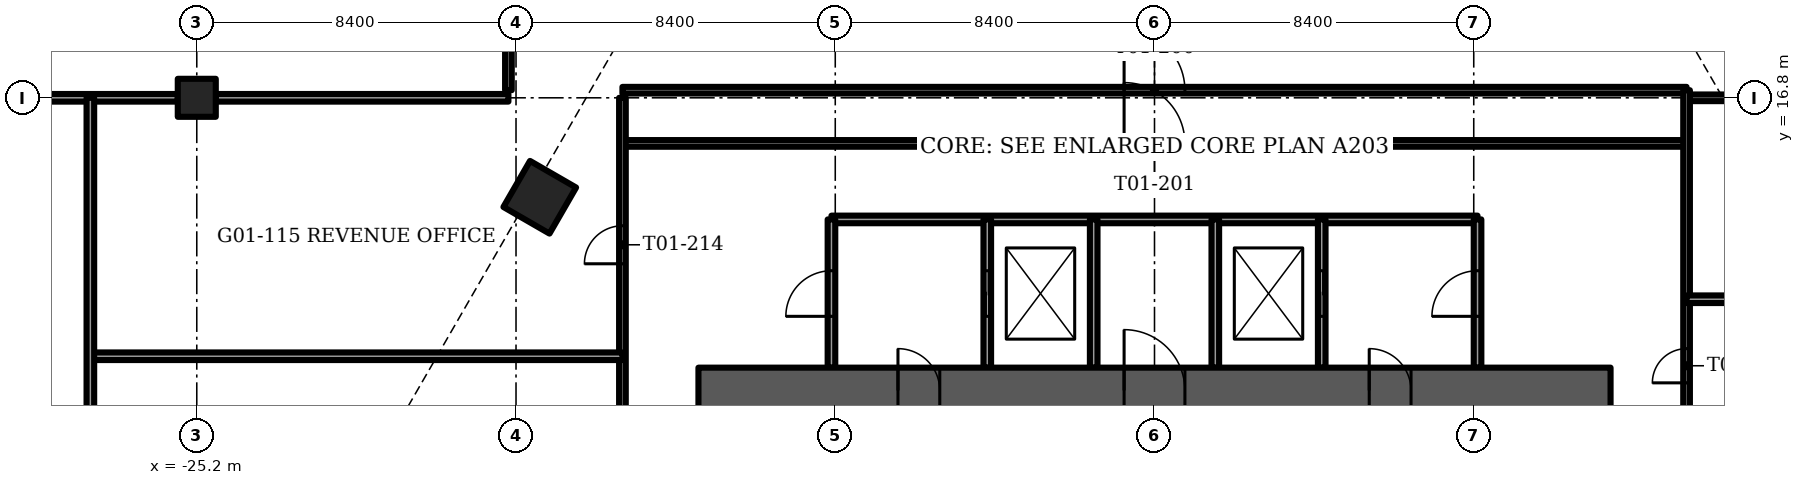
"""IFC4 building model, lengths in metres.
Left out: names, types, materials, properties, quantities, classifications, styles, units other than length and angle.
Written with IfcOpenShell. Run it as: python <this file> out.ifc"""

import sys

from ifc_helpers import new_model, si_unit, direction, frame, frame_2d, origin, origin_2d, place, context, subcontext, project, spatial, rectangle, extrude, element, fill, save


model = new_model("IFC4")
c1 = context("Model", 3, precision=1e-05, world=origin(), true_north=direction((0.0, 1.0)))
c2 = subcontext(c1, "Body", "Model", "MODEL_VIEW")
j1 = project(units=[si_unit("LENGTHUNIT", "METRE"), si_unit("PLANEANGLEUNIT", "RADIAN")], contexts=[c1])
p1 = place(None, origin())
s1 = spatial("IfcSite", under=j1, at=p1, CompositionType="ELEMENT")
p2 = place(p1, origin())
s2 = spatial("IfcBuilding", under=s1, at=p2, CompositionType="ELEMENT")
p3 = place(p2, frame((0.0, 0.0, 6.0)))
s3 = spatial("IfcBuildingStorey", under=s2, at=p3, CompositionType="ELEMENT", Elevation=6.0)
p4 = place(p3, frame((-25.2, 16.8, -0.35), z_axis=(0.0, 0.0, 1.0), x_axis=(1.0, 0.0, 0.0)))
e1 = element("IfcColumn", 1, at=p4, inside=s3, PredefinedType="COLUMN", context=c2, shape_type="SweptSolid", body=[
    extrude(rectangle(XDim=1.0, YDim=1.0, at=origin_2d()), origin(), (0.0, 0.0, 1.0), 4.0),
])
p5 = place(p3, frame((-16.175, 14.183, -1.2), z_axis=(0.0, 0.0, 1.0), x_axis=(0.5, 0.866025403784, 0.0)))
e2 = element("IfcColumn", 2, at=p5, inside=s3, PredefinedType="COLUMN", context=c2, shape_type="SweptSolid", body=[
    extrude(rectangle(XDim=1.4, YDim=1.4, at=origin_2d()), origin(), (0.0, 0.0, 1.0), 4.0),
])
p6 = place(p3, frame((-12.0, 9.1, -0.35), z_axis=(0.0, 0.0, 1.0), x_axis=(1.0, 0.0, 0.0)))
e3 = element("IfcWall", 3, at=p6, inside=s3, PredefinedType="SHEAR", context=c2, shape_type="SweptSolid", body=[
    extrude(rectangle(XDim=24.0, YDim=1.2, at=frame_2d((12.0, 0.0))), origin(), (0.0, 0.0, 1.0), 4.05),
])
p7 = place(p6, frame((11.2, 0.0, 0.0)))
e4 = element("IfcOpeningElement", 4, at=p7, cuts=e3, PredefinedType="OPENING", context=c2, shape_type="SweptSolid", body=[
    extrude(rectangle(XDim=1.6, YDim=2.1, at=frame_2d((0.8, 1.05))), frame((0.0, 0.6, 0.0), z_axis=(0.0, -1.0, 0.0), x_axis=(1.0, 0.0, 0.0)), (0.0, 0.0, 1.0), 1.2),
])
p8 = place(p6, frame((5.25, 0.0, 0.0)))
e5 = element("IfcOpeningElement", 5, at=p8, cuts=e3, PredefinedType="OPENING", context=c2, shape_type="SweptSolid", body=[
    extrude(rectangle(XDim=1.1, YDim=2.1, at=frame_2d((0.55, 1.05))), frame((0.0, 0.6, 0.0), z_axis=(0.0, -1.0, 0.0), x_axis=(1.0, 0.0, 0.0)), (0.0, 0.0, 1.0), 1.2),
])
p9 = place(p6, frame((17.65, 0.0, 0.0)))
e6 = element("IfcOpeningElement", 6, at=p9, cuts=e3, PredefinedType="OPENING", context=c2, shape_type="SweptSolid", body=[
    extrude(rectangle(XDim=1.1, YDim=2.1, at=frame_2d((0.55, 1.05))), frame((0.0, 0.6, 0.0), z_axis=(0.0, -1.0, 0.0), x_axis=(1.0, 0.0, 0.0)), (0.0, 0.0, 1.0), 1.2),
])
p10 = place(p3, frame((-8.5, 13.6, 0.0), z_axis=(0.0, 0.0, 1.0), x_axis=(1.0, 0.0, 0.0)))
e7 = element("IfcWall", 7, at=p10, inside=s3, PredefinedType="PARTITIONING", context=c2, shape_type="SweptSolid", body=[
    extrude(rectangle(XDim=17.0, YDim=0.2, at=frame_2d((8.5, 0.0))), origin(), (0.0, 0.0, 1.0), 3.7),
])
p11 = place(p3, frame((-8.5, 9.7, 0.0), z_axis=(0.0, 0.0, 1.0), x_axis=(0.0, 1.0, 0.0)))
e8 = element("IfcWall", 8, at=p11, inside=s3, PredefinedType="PARTITIONING", context=c2, shape_type="SweptSolid", body=[
    extrude(rectangle(XDim=3.9, YDim=0.2, at=frame_2d((1.95, 0.0))), origin(), (0.0, 0.0, 1.0), 3.7),
])
p12 = place(p11, frame((1.35, 0.0, 0.0)))
e9 = element("IfcOpeningElement", 9, at=p12, cuts=e8, PredefinedType="OPENING", context=c2, shape_type="SweptSolid", body=[
    extrude(rectangle(XDim=1.2, YDim=2.1, at=frame_2d((0.6, 1.05))), frame((0.0, 0.1, 0.0), z_axis=(0.0, -1.0, 0.0), x_axis=(1.0, 0.0, 0.0)), (0.0, 0.0, 1.0), 0.2),
])
p13 = place(p3, frame((8.5, 9.7, 0.0), z_axis=(0.0, 0.0, 1.0), x_axis=(0.0, 1.0, 0.0)))
e10 = element("IfcWall", 10, at=p13, inside=s3, PredefinedType="PARTITIONING", context=c2, shape_type="SweptSolid", body=[
    extrude(rectangle(XDim=3.9, YDim=0.2, at=frame_2d((1.95, 0.0))), origin(), (0.0, 0.0, 1.0), 3.7),
])
p14 = place(p13, frame((1.35, 0.0, 0.0)))
e11 = element("IfcOpeningElement", 11, at=p14, cuts=e10, PredefinedType="OPENING", context=c2, shape_type="SweptSolid", body=[
    extrude(rectangle(XDim=1.2, YDim=2.1, at=frame_2d((0.6, 1.05))), frame((0.0, 0.1, 0.0), z_axis=(0.0, -1.0, 0.0), x_axis=(1.0, 0.0, 0.0)), (0.0, 0.0, 1.0), 0.2),
])
p15 = place(p3, frame((-4.4, 9.7, 0.0), z_axis=(0.0, 0.0, 1.0), x_axis=(0.0, 1.0, 0.0)))
e12 = element("IfcWall", 12, at=p15, inside=s3, PredefinedType="PARTITIONING", context=c2, shape_type="SweptSolid", body=[
    extrude(rectangle(XDim=3.9, YDim=0.2, at=frame_2d((1.95, 0.0))), origin(), (0.0, 0.0, 1.0), 3.7),
])
p16 = place(p15, frame((1.35, 0.0, 0.0)))
e13 = element("IfcOpeningElement", 13, at=p16, cuts=e12, PredefinedType="OPENING", context=c2, shape_type="SweptSolid", body=[
    extrude(rectangle(XDim=1.2, YDim=2.1, at=frame_2d((0.6, 1.05))), frame((0.0, 0.1, 0.0), z_axis=(0.0, -1.0, 0.0), x_axis=(1.0, 0.0, 0.0)), (0.0, 0.0, 1.0), 0.2),
])
p17 = place(p3, frame((4.4, 9.7, 0.0), z_axis=(0.0, 0.0, 1.0), x_axis=(0.0, 1.0, 0.0)))
e14 = element("IfcWall", 14, at=p17, inside=s3, PredefinedType="PARTITIONING", context=c2, shape_type="SweptSolid", body=[
    extrude(rectangle(XDim=3.9, YDim=0.2, at=frame_2d((1.95, 0.0))), origin(), (0.0, 0.0, 1.0), 3.7),
])
p18 = place(p17, frame((1.35, 0.0, 0.0)))
e15 = element("IfcOpeningElement", 15, at=p18, cuts=e14, PredefinedType="OPENING", context=c2, shape_type="SweptSolid", body=[
    extrude(rectangle(XDim=1.2, YDim=2.1, at=frame_2d((0.6, 1.05))), frame((0.0, 0.1, 0.0), z_axis=(0.0, -1.0, 0.0), x_axis=(1.0, 0.0, 0.0)), (0.0, 0.0, 1.0), 0.2),
])
for number, where, z_axis, x_axis in (
    (16, (-1.6, 9.7, 0.0), (0.0, 0.0, 1.0), (0.0, 1.0, 0.0)),
    (17, (1.6, 9.7, 0.0), (0.0, 0.0, 1.0), (0.0, 1.0, 0.0)),
):
    element("IfcWall", number, at=place(p3, frame(where, z_axis=z_axis, x_axis=x_axis)), inside=s3, PredefinedType="PARTITIONING", context=c2, shape_type="SweptSolid", body=[
        extrude(rectangle(XDim=3.9, YDim=0.2, at=frame_2d((1.95, 0.0))), origin(), (0.0, 0.0, 1.0), 3.7),
    ])
p19 = place(p3, frame((-14.0, 15.6, 0.0), z_axis=(0.0, 0.0, 1.0), x_axis=(1.0, 0.0, 0.0)))
e18 = element("IfcWall", 18, at=p19, inside=s3, PredefinedType="PARTITIONING", context=c2, shape_type="SweptSolid", body=[
    extrude(rectangle(XDim=28.0, YDim=0.175, at=frame_2d((14.0, 0.0))), origin(), (0.0, 0.0, 1.0), 3.65),
])
p20 = place(p19, frame((13.2, 0.0, 0.0)))
e19 = element("IfcOpeningElement", 19, at=p20, cuts=e18, PredefinedType="OPENING", context=c2, shape_type="SweptSolid", body=[
    extrude(rectangle(XDim=1.6, YDim=2.1, at=frame_2d((0.8, 1.05))), frame((0.0, 0.087, 0.0), z_axis=(0.0, -1.0, 0.0), x_axis=(1.0, 0.0, 0.0)), (0.0, 0.0, 1.0), 0.175),
])
p21 = place(p3, frame((14.0, 16.8, 0.0), z_axis=(0.0, 0.0, 1.0), x_axis=(1.0, 0.0, 0.0)))
e20 = element("IfcWall", 20, at=p21, inside=s3, PredefinedType="PARTITIONING", context=c2, shape_type="SweptSolid", body=[
    extrude(rectangle(XDim=8.302, YDim=0.175, at=frame_2d((4.151, 0.0))), origin(), (0.0, 0.0, 1.0), 2.8),
])
p22 = place(p3, frame((-14.0, 17.0, 0.0), z_axis=(0.0, 0.0, 1.0), x_axis=(1.0, 0.0, 0.0)))
e21 = element("IfcWall", 21, at=p22, inside=s3, PredefinedType="PARTITIONING", context=c2, shape_type="SweptSolid", body=[
    extrude(rectangle(XDim=28.0, YDim=0.175, at=frame_2d((14.0, 0.0))), origin(), (0.0, 0.0, 1.0), 3.65),
])
p23 = place(p22, frame((13.2, 0.0, 0.0)))
e22 = element("IfcOpeningElement", 22, at=p23, cuts=e21, PredefinedType="OPENING", context=c2, shape_type="SweptSolid", body=[
    extrude(rectangle(XDim=1.6, YDim=2.1, at=frame_2d((0.8, 1.05))), frame((0.0, 0.087, 0.0), z_axis=(0.0, -1.0, 0.0), x_axis=(1.0, 0.0, 0.0)), (0.0, 0.0, 1.0), 0.175),
])
p24 = place(p3, frame((-17.0, 17.0, 0.0), z_axis=(0.0, 0.0, 1.0), x_axis=(0.0, 1.0, 0.0)))
e23 = element("IfcWall", 23, at=p24, inside=s3, PredefinedType="PARTITIONING", context=c2, shape_type="SweptSolid", body=[
    extrude(rectangle(XDim=5.2, YDim=0.175, at=frame_2d((2.6, 0.0))), origin(), (0.0, 0.0, 1.0), 3.65),
])
p25 = place(p24, frame((2.1, 0.0, 0.0)))
e24 = element("IfcOpeningElement", 24, at=p25, cuts=e23, PredefinedType="OPENING", context=c2, shape_type="SweptSolid", body=[
    extrude(rectangle(XDim=1.0, YDim=2.1, at=frame_2d((0.5, 1.05))), frame((0.0, 0.087, 0.0), z_axis=(0.0, -1.0, 0.0), x_axis=(1.0, 0.0, 0.0)), (0.0, 0.0, 1.0), 0.175),
])
p26 = place(p3, frame((-14.0, -29.195, 0.0), z_axis=(0.0, 0.0, 1.0), x_axis=(0.0, 1.0, 0.0)))
e25 = element("IfcWall", 25, at=p26, inside=s3, PredefinedType="PARTITIONING", context=c2, shape_type="SweptSolid", body=[
    extrude(rectangle(XDim=45.995, YDim=0.175, at=frame_2d((22.998, 0.0))), origin(), (0.0, 0.0, 1.0), 2.8),
])
p27 = place(p26, frame((4.395, 0.0, 0.0)))
e26 = element("IfcOpeningElement", 26, at=p27, cuts=e25, PredefinedType="OPENING", context=c2, shape_type="SweptSolid", body=[
    extrude(rectangle(XDim=1.6, YDim=2.1, at=frame_2d((0.8, 1.05))), frame((0.0, 0.087, 0.0), z_axis=(0.0, -1.0, 0.0), x_axis=(1.0, 0.0, 0.0)), (0.0, 0.0, 1.0), 0.175),
])
p28 = place(p26, frame((9.815, 0.0, 0.0)))
e27 = element("IfcOpeningElement", 27, at=p28, cuts=e25, PredefinedType="OPENING", context=c2, shape_type="SweptSolid", body=[
    extrude(rectangle(XDim=0.9, YDim=2.1, at=frame_2d((0.45, 1.05))), frame((0.0, 0.087, 0.0), z_axis=(0.0, -1.0, 0.0), x_axis=(1.0, 0.0, 0.0)), (0.0, 0.0, 1.0), 0.175),
])
p29 = place(p26, frame((20.595, 0.0, 0.0)))
e28 = element("IfcOpeningElement", 28, at=p29, cuts=e25, PredefinedType="OPENING", context=c2, shape_type="SweptSolid", body=[
    extrude(rectangle(XDim=1.0, YDim=2.1, at=frame_2d((0.5, 1.05))), frame((0.0, 0.087, 0.0), z_axis=(0.0, -1.0, 0.0), x_axis=(1.0, 0.0, 0.0)), (0.0, 0.0, 1.0), 0.175),
])
p30 = place(p26, frame((28.595, 0.0, 0.0)))
e29 = element("IfcOpeningElement", 29, at=p30, cuts=e25, PredefinedType="OPENING", context=c2, shape_type="SweptSolid", body=[
    extrude(rectangle(XDim=1.0, YDim=2.1, at=frame_2d((0.5, 1.05))), frame((0.0, 0.087, 0.0), z_axis=(0.0, -1.0, 0.0), x_axis=(1.0, 0.0, 0.0)), (0.0, 0.0, 1.0), 0.175),
])
p31 = place(p26, frame((35.445, 0.0, 0.0)))
e30 = element("IfcOpeningElement", 30, at=p31, cuts=e25, PredefinedType="OPENING", context=c2, shape_type="SweptSolid", body=[
    extrude(rectangle(XDim=1.0, YDim=2.1, at=frame_2d((0.5, 1.05))), frame((0.0, 0.087, 0.0), z_axis=(0.0, -1.0, 0.0), x_axis=(1.0, 0.0, 0.0)), (0.0, 0.0, 1.0), 0.175),
])
p32 = place(p26, frame((41.628, 0.0, 0.0)))
e31 = element("IfcOpeningElement", 31, at=p32, cuts=e25, PredefinedType="OPENING", context=c2, shape_type="SweptSolid", body=[
    extrude(rectangle(XDim=1.0, YDim=2.1, at=frame_2d((0.5, 1.05))), frame((0.0, 0.087, 0.0), z_axis=(0.0, -1.0, 0.0), x_axis=(1.0, 0.0, 0.0)), (0.0, 0.0, 1.0), 0.175),
])
p33 = place(p3, frame((14.0, -21.0, 0.0), z_axis=(0.0, 0.0, 1.0), x_axis=(0.0, 1.0, 0.0)))
e32 = element("IfcWall", 32, at=p33, inside=s3, PredefinedType="PARTITIONING", context=c2, shape_type="SweptSolid", body=[
    extrude(rectangle(XDim=38.0, YDim=0.175, at=frame_2d((19.0, 0.0))), origin(), (0.0, 0.0, 1.0), 2.8),
])
p34 = place(p33, frame((12.2, 0.0, 0.0)))
e33 = element("IfcOpeningElement", 33, at=p34, cuts=e32, PredefinedType="OPENING", context=c2, shape_type="SweptSolid", body=[
    extrude(rectangle(XDim=0.9, YDim=2.1, at=frame_2d((0.45, 1.05))), frame((0.0, 0.087, 0.0), z_axis=(0.0, -1.0, 0.0), x_axis=(1.0, 0.0, 0.0)), (0.0, 0.0, 1.0), 0.175),
])
p35 = place(p33, frame((19.7, 0.0, 0.0)))
e34 = element("IfcOpeningElement", 34, at=p35, cuts=e32, PredefinedType="OPENING", context=c2, shape_type="SweptSolid", body=[
    extrude(rectangle(XDim=0.9, YDim=2.1, at=frame_2d((0.45, 1.05))), frame((0.0, 0.087, 0.0), z_axis=(0.0, -1.0, 0.0), x_axis=(1.0, 0.0, 0.0)), (0.0, 0.0, 1.0), 0.175),
])
p36 = place(p33, frame((25.55, 0.0, 0.0)))
e35 = element("IfcOpeningElement", 35, at=p36, cuts=e32, PredefinedType="OPENING", context=c2, shape_type="SweptSolid", body=[
    extrude(rectangle(XDim=0.9, YDim=2.1, at=frame_2d((0.45, 1.05))), frame((0.0, 0.087, 0.0), z_axis=(0.0, -1.0, 0.0), x_axis=(1.0, 0.0, 0.0)), (0.0, 0.0, 1.0), 0.175),
])
p37 = place(p33, frame((30.3, 0.0, 0.0)))
e36 = element("IfcOpeningElement", 36, at=p37, cuts=e32, PredefinedType="OPENING", context=c2, shape_type="SweptSolid", body=[
    extrude(rectangle(XDim=0.9, YDim=2.1, at=frame_2d((0.45, 1.05))), frame((0.0, 0.087, 0.0), z_axis=(0.0, -1.0, 0.0), x_axis=(1.0, 0.0, 0.0)), (0.0, 0.0, 1.0), 0.175),
])
p38 = place(p3, frame((-28.0, 10.0, 0.0), z_axis=(0.0, 0.0, 1.0), x_axis=(1.0, 0.0, 0.0)))
e37 = element("IfcWall", 37, at=p38, inside=s3, PredefinedType="PARTITIONING", context=c2, shape_type="SweptSolid", body=[
    extrude(rectangle(XDim=14.0, YDim=0.2, at=frame_2d((7.0, 0.0))), origin(), (0.0, 0.0, 1.0), 2.8),
])
p39 = place(p3, frame((14.0, 11.5, 0.0), z_axis=(0.0, 0.0, 1.0), x_axis=(1.0, 0.0, 0.0)))
e38 = element("IfcWall", 38, at=p39, inside=s3, PredefinedType="PARTITIONING", context=c2, shape_type="SweptSolid", body=[
    extrude(rectangle(XDim=8.302, YDim=0.2, at=frame_2d((4.151, 0.0))), origin(), (0.0, 0.0, 1.0), 2.8),
])
p40 = place(p39, frame((1.625, 0.0, 0.0)))
e39 = element("IfcOpeningElement", 39, at=p40, cuts=e38, PredefinedType="OPENING", context=c2, shape_type="SweptSolid", body=[
    extrude(rectangle(XDim=0.9, YDim=2.1, at=frame_2d((0.45, 1.05))), frame((0.0, 0.1, 0.0), z_axis=(0.0, -1.0, 0.0), x_axis=(1.0, 0.0, 0.0)), (0.0, 0.0, 1.0), 0.2),
])
p41 = place(p39, frame((5.776, 0.0, 0.0)))
e40 = element("IfcOpeningElement", 40, at=p41, cuts=e38, PredefinedType="OPENING", context=c2, shape_type="SweptSolid", body=[
    extrude(rectangle(XDim=0.9, YDim=2.1, at=frame_2d((0.45, 1.05))), frame((0.0, 0.1, 0.0), z_axis=(0.0, -1.0, 0.0), x_axis=(1.0, 0.0, 0.0)), (0.0, 0.0, 1.0), 0.2),
])
p42 = place(p3, frame((-33.1, 16.8, 0.0), z_axis=(0.0, 0.0, 1.0), x_axis=(1.0, 0.0, 0.0)))
e41 = element("IfcWall", 41, at=p42, inside=s3, PredefinedType="PARTITIONING", context=c2, shape_type="SweptSolid", body=[
    extrude(rectangle(XDim=7.4, YDim=0.2, at=frame_2d((3.7, 0.0))), origin(), (0.0, 0.0, 1.0), 3.65),
])
p43 = place(p3, frame((-24.7, 16.8, 0.0), z_axis=(0.0, 0.0, 1.0), x_axis=(1.0, 0.0, 0.0)))
e42 = element("IfcWall", 42, at=p43, inside=s3, PredefinedType="PARTITIONING", context=c2, shape_type="SweptSolid", body=[
    extrude(rectangle(XDim=7.7, YDim=0.2, at=frame_2d((3.85, 0.0))), origin(), (0.0, 0.0, 1.0), 3.65),
])
p44 = place(p3, frame((-28.0, -21.0, 0.0), z_axis=(0.0, 0.0, 1.0), x_axis=(0.0, 1.0, 0.0)))
e43 = element("IfcWall", 43, at=p44, inside=s3, PredefinedType="PARTITIONING", context=c2, shape_type="SweptSolid", body=[
    extrude(rectangle(XDim=37.8, YDim=0.2, at=frame_2d((18.9, 0.0))), origin(), (0.0, 0.0, 1.0), 3.65),
])
p45 = place(p44, frame((19.45, 0.0, 0.0)))
e44 = element("IfcOpeningElement", 44, at=p45, cuts=e43, PredefinedType="OPENING", context=c2, shape_type="SweptSolid", body=[
    extrude(rectangle(XDim=1.0, YDim=2.1, at=frame_2d((0.5, 1.05))), frame((0.0, 0.1, 0.0), z_axis=(0.0, -1.0, 0.0), x_axis=(1.0, 0.0, 0.0)), (0.0, 0.0, 1.0), 0.2),
])
p46 = place(p7, origin())
e45 = element("IfcDoor", 45, at=p46, inside=s3, OperationType="DOUBLE_DOOR_SINGLE_SWING", PredefinedType="DOOR", context=c2, shape_type="SweptSolid", body=[
    extrude(rectangle(XDim=1.6, YDim=2.1, at=frame_2d((0.8, 1.05))), frame((0.0, 0.025, 0.0), z_axis=(0.0, -1.0, 0.0), x_axis=(1.0, 0.0, 0.0)), (0.0, 0.0, 1.0), 0.05),
])
fill(e4, e45)
p47 = place(p8, origin())
e46 = element("IfcDoor", 46, at=p47, inside=s3, OperationType="SINGLE_SWING_LEFT", PredefinedType="DOOR", context=c2, shape_type="SweptSolid", body=[
    extrude(rectangle(XDim=1.1, YDim=2.1, at=frame_2d((0.55, 1.05))), frame((0.0, 0.025, 0.0), z_axis=(0.0, -1.0, 0.0), x_axis=(1.0, 0.0, 0.0)), (0.0, 0.0, 1.0), 0.05),
])
fill(e5, e46)
p48 = place(p9, origin())
e47 = element("IfcDoor", 47, at=p48, inside=s3, OperationType="SINGLE_SWING_RIGHT", PredefinedType="DOOR", context=c2, shape_type="SweptSolid", body=[
    extrude(rectangle(XDim=1.1, YDim=2.1, at=frame_2d((0.55, 1.05))), frame((0.0, 0.025, 0.0), z_axis=(0.0, -1.0, 0.0), x_axis=(1.0, 0.0, 0.0)), (0.0, 0.0, 1.0), 0.05),
])
fill(e6, e47)
p49 = place(p16, origin())
e48 = element("IfcDoor", 48, at=p49, inside=s3, OperationType="SLIDING_TO_LEFT", PredefinedType="DOOR", context=c2, shape_type="SweptSolid", body=[
    extrude(rectangle(XDim=1.2, YDim=2.1, at=frame_2d((0.6, 1.05))), frame((0.0, 0.025, 0.0), z_axis=(0.0, -1.0, 0.0), x_axis=(1.0, 0.0, 0.0)), (0.0, 0.0, 1.0), 0.05),
])
fill(e13, e48)
p50 = place(p12, origin())
e49 = element("IfcDoor", 49, at=p50, inside=s3, OperationType="SINGLE_SWING_LEFT", PredefinedType="DOOR", context=c2, shape_type="SweptSolid", body=[
    extrude(rectangle(XDim=1.2, YDim=2.1, at=frame_2d((0.6, 1.05))), frame((0.0, 0.025, 0.0), z_axis=(0.0, -1.0, 0.0), x_axis=(1.0, 0.0, 0.0)), (0.0, 0.0, 1.0), 0.05),
])
fill(e9, e49)
p51 = place(p18, origin())
e50 = element("IfcDoor", 50, at=p51, inside=s3, OperationType="SLIDING_TO_LEFT", PredefinedType="DOOR", context=c2, shape_type="SweptSolid", body=[
    extrude(rectangle(XDim=1.2, YDim=2.1, at=frame_2d((0.6, 1.05))), frame((0.0, 0.025, 0.0), z_axis=(0.0, -1.0, 0.0), x_axis=(1.0, 0.0, 0.0)), (0.0, 0.0, 1.0), 0.05),
])
fill(e15, e50)
p52 = place(p14, origin())
e51 = element("IfcDoor", 51, at=p52, inside=s3, OperationType="SINGLE_SWING_LEFT", PredefinedType="DOOR", context=c2, shape_type="SweptSolid", body=[
    extrude(rectangle(XDim=1.2, YDim=2.1, at=frame_2d((0.6, 1.05))), frame((0.0, 0.025, 0.0), z_axis=(0.0, -1.0, 0.0), x_axis=(1.0, 0.0, 0.0)), (0.0, 0.0, 1.0), 0.05),
])
fill(e11, e51)
p53 = place(p23, origin())
e52 = element("IfcDoor", 52, at=p53, inside=s3, OperationType="DOUBLE_DOOR_SINGLE_SWING", PredefinedType="DOOR", context=c2, shape_type="SweptSolid", body=[
    extrude(rectangle(XDim=1.6, YDim=2.1, at=frame_2d((0.8, 1.05))), frame((0.0, 0.025, 0.0), z_axis=(0.0, -1.0, 0.0), x_axis=(1.0, 0.0, 0.0)), (0.0, 0.0, 1.0), 0.05),
])
fill(e22, e52)
p54 = place(p20, origin())
e53 = element("IfcDoor", 53, at=p54, inside=s3, OperationType="DOUBLE_DOOR_SINGLE_SWING", PredefinedType="DOOR", context=c2, shape_type="SweptSolid", body=[
    extrude(rectangle(XDim=1.6, YDim=2.1, at=frame_2d((0.8, 1.05))), frame((0.0, 0.025, 0.0), z_axis=(0.0, -1.0, 0.0), x_axis=(1.0, 0.0, 0.0)), (0.0, 0.0, 1.0), 0.05),
])
fill(e19, e53)
p55 = place(p32, origin())
e54 = element("IfcDoor", 54, at=p55, inside=s3, OperationType="SINGLE_SWING_RIGHT", PredefinedType="DOOR", context=c2, shape_type="SweptSolid", body=[
    extrude(rectangle(XDim=1.0, YDim=2.1, at=frame_2d((0.5, 1.05))), frame((0.0, 0.025, 0.0), z_axis=(0.0, -1.0, 0.0), x_axis=(1.0, 0.0, 0.0)), (0.0, 0.0, 1.0), 0.05),
])
fill(e31, e54)
p56 = place(p37, origin())
e55 = element("IfcDoor", 55, at=p56, inside=s3, OperationType="SINGLE_SWING_LEFT", PredefinedType="DOOR", context=c2, shape_type="SweptSolid", body=[
    extrude(rectangle(XDim=0.9, YDim=2.1, at=frame_2d((0.45, 1.05))), frame((0.0, 0.025, 0.0), z_axis=(0.0, -1.0, 0.0), x_axis=(1.0, 0.0, 0.0)), (0.0, 0.0, 1.0), 0.05),
])
fill(e36, e55)
save(model, sys.argv[1])
